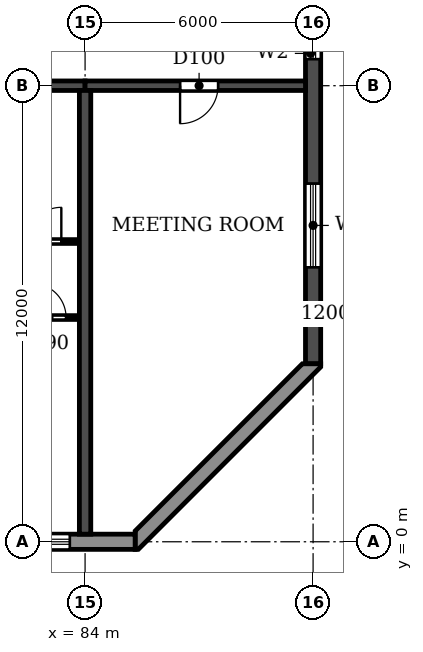
"""IFC4 building model, lengths in metres.
Left out: names, types, materials, properties, quantities, classifications, styles, units other than length and angle.
Written with IfcOpenShell. Run it as: python <this file> out.ifc"""

import sys

from ifc_helpers import new_model, si_unit, direction, frame, frame_2d, origin, place, context, subcontext, project, spatial, polyline, rectangle, outline, extrude, element, fill, save


model = new_model("IFC4")
c1 = context("Model", 3, precision=1e-05, world=origin(), true_north=direction((0.0, 1.0)))
c2 = subcontext(c1, "Body", "Model", "MODEL_VIEW")
j1 = project(units=[si_unit("LENGTHUNIT", "METRE"), si_unit("PLANEANGLEUNIT", "RADIAN")], contexts=[c1])
p1 = place(None, origin())
s1 = spatial("IfcSite", under=j1, at=p1, CompositionType="ELEMENT")
p2 = place(p1, origin())
s2 = spatial("IfcBuilding", under=s1, at=p2, CompositionType="ELEMENT")
p3 = place(p2, frame((0.0, 0.0, 152.1)))
s3 = spatial("IfcBuildingStorey", under=s2, at=p3, CompositionType="ELEMENT", Elevation=152.1)
p4 = place(p3, frame((84.0, 0.2, 0.0), z_axis=(0.0, 0.0, 1.0), x_axis=(0.0, 1.0, 0.0)))
e1 = element("IfcWall", 1, at=p4, inside=s3, PredefinedType="SHEAR", context=c2, shape_type="SweptSolid", body=[
    extrude(rectangle(XDim=11.675, YDim=0.3, at=frame_2d((5.837, 0.0))), origin(), (0.0, 0.0, 1.0), 3.07),
])
p5 = place(p3, frame((90.0, 4.683, 0.0), z_axis=(0.0, 0.0, 1.0), x_axis=(0.0, 1.0, 0.0)))
e2 = element("IfcWall", 2, at=p5, inside=s3, PredefinedType="SHEAR", context=c2, shape_type="SweptSolid", body=[
    extrude(rectangle(XDim=33.034, YDim=0.4, at=frame_2d((16.517, 0.0))), origin(), (0.0, 0.0, 1.0), 3.07),
])
p6 = place(p5, frame((23.817, 0.0, 0.9)))
e3 = element("IfcOpeningElement", 3, at=p6, cuts=e2, PredefinedType="OPENING", context=c2, shape_type="SweptSolid", body=[
    extrude(rectangle(XDim=1.2, YDim=1.5, at=frame_2d((0.6, 0.75))), frame((0.0, 0.21, 0.0), z_axis=(0.0, -1.0, 0.0), x_axis=(1.0, 0.0, 0.0)), (0.0, 0.0, 1.0), 0.42),
])
p7 = place(p5, frame((8.017, 0.0, 0.9)))
e4 = element("IfcOpeningElement", 4, at=p7, cuts=e2, PredefinedType="OPENING", context=c2, shape_type="SweptSolid", body=[
    extrude(rectangle(XDim=1.2, YDim=1.5, at=frame_2d((0.6, 0.75))), frame((0.0, 0.21, 0.0), z_axis=(0.0, -1.0, 0.0), x_axis=(1.0, 0.0, 0.0)), (0.0, 0.0, 1.0), 0.42),
])
p8 = place(p5, frame((28.293, 0.0, 0.6)))
e5 = element("IfcOpeningElement", 5, at=p8, cuts=e2, PredefinedType="OPENING", context=c2, shape_type="SweptSolid", body=[
    extrude(rectangle(XDim=2.2, YDim=1.8, at=frame_2d((1.1, 0.9))), frame((0.0, 0.21, 0.0), z_axis=(0.0, -1.0, 0.0), x_axis=(1.0, 0.0, 0.0)), (0.0, 0.0, 1.0), 0.42),
])
p9 = place(p5, frame((2.541, 0.0, 0.6)))
e6 = element("IfcOpeningElement", 6, at=p9, cuts=e2, PredefinedType="OPENING", context=c2, shape_type="SweptSolid", body=[
    extrude(rectangle(XDim=2.2, YDim=1.8, at=frame_2d((1.1, 0.9))), frame((0.0, 0.21, 0.0), z_axis=(0.0, -1.0, 0.0), x_axis=(1.0, 0.0, 0.0)), (0.0, 0.0, 1.0), 0.42),
])
p10 = place(p5, frame((19.417, 0.0, 0.6)))
e7 = element("IfcOpeningElement", 7, at=p10, cuts=e2, PredefinedType="OPENING", context=c2, shape_type="SweptSolid", body=[
    extrude(rectangle(XDim=2.2, YDim=1.8, at=frame_2d((1.1, 0.9))), frame((0.0, 0.21, 0.0), z_axis=(0.0, -1.0, 0.0), x_axis=(1.0, 0.0, 0.0)), (0.0, 0.0, 1.0), 0.42),
])
p11 = place(p3, frame((78.0, 12.0, 0.0), z_axis=(0.0, 0.0, 1.0), x_axis=(1.0, 0.0, 0.0)))
e8 = element("IfcWall", 8, at=p11, inside=s3, PredefinedType="SHEAR", context=c2, shape_type="SweptSolid", body=[
    extrude(rectangle(XDim=6.0, YDim=0.25, at=frame_2d((3.0, 0.0))), origin(), (0.0, 0.0, 1.0), 2.47),
])
p12 = place(p11, frame((2.45, 0.0, 0.0)))
e9 = element("IfcOpeningElement", 9, at=p12, cuts=e8, PredefinedType="OPENING", context=c2, shape_type="SweptSolid", body=[
    extrude(rectangle(XDim=1.0, YDim=2.1, at=frame_2d((0.5, 1.05))), frame((0.0, 0.135, 0.0), z_axis=(0.0, -1.0, 0.0), x_axis=(1.0, 0.0, 0.0)), (0.0, 0.0, 1.0), 0.27),
])
p13 = place(p3, frame((84.0, 12.0, 0.0), z_axis=(0.0, 0.0, 1.0), x_axis=(1.0, 0.0, 0.0)))
e10 = element("IfcWall", 10, at=p13, inside=s3, PredefinedType="SHEAR", context=c2, shape_type="SweptSolid", body=[
    extrude(rectangle(XDim=5.8, YDim=0.25, at=frame_2d((2.9, 0.0))), origin(), (0.0, 0.0, 1.0), 2.47),
])
p14 = place(p13, frame((2.5, 0.0, 0.0)))
e11 = element("IfcOpeningElement", 11, at=p14, cuts=e10, PredefinedType="OPENING", context=c2, shape_type="SweptSolid", body=[
    extrude(rectangle(XDim=1.0, YDim=2.1, at=frame_2d((0.5, 1.05))), frame((0.0, 0.135, 0.0), z_axis=(0.0, -1.0, 0.0), x_axis=(1.0, 0.0, 0.0)), (0.0, 0.0, 1.0), 0.27),
])
p15 = place(p3, frame((16.683, 0.0, 0.0), z_axis=(0.0, 0.0, 1.0), x_axis=(1.0, 0.0, 0.0)))
e12 = element("IfcWall", 12, at=p15, inside=s3, PredefinedType="STANDARD", context=c2, shape_type="SweptSolid", body=[
    extrude(rectangle(XDim=68.634, YDim=0.4, at=frame_2d((34.317, 0.0))), origin(), (0.0, 0.0, 1.0), 3.07),
])
p16 = place(p15, frame((1.717, 0.0, 0.9)))
e13 = element("IfcOpeningElement", 13, at=p16, cuts=e12, PredefinedType="OPENING", context=c2, shape_type="SweptSolid", body=[
    extrude(rectangle(XDim=2.2, YDim=1.5, at=frame_2d((1.1, 0.75))), frame((0.0, 0.21, 0.0), z_axis=(0.0, -1.0, 0.0), x_axis=(1.0, 0.0, 0.0)), (0.0, 0.0, 1.0), 0.42),
])
p17 = place(p15, frame((4.717, 0.0, 0.9)))
e14 = element("IfcOpeningElement", 14, at=p17, cuts=e12, PredefinedType="OPENING", context=c2, shape_type="SweptSolid", body=[
    extrude(rectangle(XDim=2.2, YDim=1.5, at=frame_2d((1.1, 0.75))), frame((0.0, 0.21, 0.0), z_axis=(0.0, -1.0, 0.0), x_axis=(1.0, 0.0, 0.0)), (0.0, 0.0, 1.0), 0.42),
])
p18 = place(p15, frame((7.917, 0.0, 0.0)))
e15 = element("IfcOpeningElement", 15, at=p18, cuts=e12, PredefinedType="OPENING", context=c2, shape_type="SweptSolid", body=[
    extrude(rectangle(XDim=1.8, YDim=2.4, at=frame_2d((0.9, 1.2))), frame((0.0, 0.21, 0.0), z_axis=(0.0, -1.0, 0.0), x_axis=(1.0, 0.0, 0.0)), (0.0, 0.0, 1.0), 0.42),
])
p19 = place(p15, frame((10.717, 0.0, 0.9)))
e16 = element("IfcOpeningElement", 16, at=p19, cuts=e12, PredefinedType="OPENING", context=c2, shape_type="SweptSolid", body=[
    extrude(rectangle(XDim=2.2, YDim=1.5, at=frame_2d((1.1, 0.75))), frame((0.0, 0.21, 0.0), z_axis=(0.0, -1.0, 0.0), x_axis=(1.0, 0.0, 0.0)), (0.0, 0.0, 1.0), 0.42),
])
p20 = place(p15, frame((13.717, 0.0, 0.9)))
e17 = element("IfcOpeningElement", 17, at=p20, cuts=e12, PredefinedType="OPENING", context=c2, shape_type="SweptSolid", body=[
    extrude(rectangle(XDim=2.2, YDim=1.5, at=frame_2d((1.1, 0.75))), frame((0.0, 0.21, 0.0), z_axis=(0.0, -1.0, 0.0), x_axis=(1.0, 0.0, 0.0)), (0.0, 0.0, 1.0), 0.42),
])
p21 = place(p15, frame((16.717, 0.0, 0.9)))
e18 = element("IfcOpeningElement", 18, at=p21, cuts=e12, PredefinedType="OPENING", context=c2, shape_type="SweptSolid", body=[
    extrude(rectangle(XDim=2.2, YDim=1.5, at=frame_2d((1.1, 0.75))), frame((0.0, 0.21, 0.0), z_axis=(0.0, -1.0, 0.0), x_axis=(1.0, 0.0, 0.0)), (0.0, 0.0, 1.0), 0.42),
])
p22 = place(p15, frame((19.717, 0.0, 0.9)))
e19 = element("IfcOpeningElement", 19, at=p22, cuts=e12, PredefinedType="OPENING", context=c2, shape_type="SweptSolid", body=[
    extrude(rectangle(XDim=2.2, YDim=1.5, at=frame_2d((1.1, 0.75))), frame((0.0, 0.21, 0.0), z_axis=(0.0, -1.0, 0.0), x_axis=(1.0, 0.0, 0.0)), (0.0, 0.0, 1.0), 0.42),
])
p23 = place(p15, frame((22.917, 0.0, 0.0)))
e20 = element("IfcOpeningElement", 20, at=p23, cuts=e12, PredefinedType="OPENING", context=c2, shape_type="SweptSolid", body=[
    extrude(rectangle(XDim=1.8, YDim=2.4, at=frame_2d((0.9, 1.2))), frame((0.0, 0.21, 0.0), z_axis=(0.0, -1.0, 0.0), x_axis=(1.0, 0.0, 0.0)), (0.0, 0.0, 1.0), 0.42),
])
p24 = place(p15, frame((25.717, 0.0, 0.9)))
e21 = element("IfcOpeningElement", 21, at=p24, cuts=e12, PredefinedType="OPENING", context=c2, shape_type="SweptSolid", body=[
    extrude(rectangle(XDim=2.2, YDim=1.5, at=frame_2d((1.1, 0.75))), frame((0.0, 0.21, 0.0), z_axis=(0.0, -1.0, 0.0), x_axis=(1.0, 0.0, 0.0)), (0.0, 0.0, 1.0), 0.42),
])
p25 = place(p15, frame((28.717, 0.0, 0.9)))
e22 = element("IfcOpeningElement", 22, at=p25, cuts=e12, PredefinedType="OPENING", context=c2, shape_type="SweptSolid", body=[
    extrude(rectangle(XDim=2.2, YDim=1.5, at=frame_2d((1.1, 0.75))), frame((0.0, 0.21, 0.0), z_axis=(0.0, -1.0, 0.0), x_axis=(1.0, 0.0, 0.0)), (0.0, 0.0, 1.0), 0.42),
])
p26 = place(p15, frame((31.917, 0.0, 0.0)))
e23 = element("IfcOpeningElement", 23, at=p26, cuts=e12, PredefinedType="OPENING", context=c2, shape_type="SweptSolid", body=[
    extrude(rectangle(XDim=1.8, YDim=2.4, at=frame_2d((0.9, 1.2))), frame((0.0, 0.21, 0.0), z_axis=(0.0, -1.0, 0.0), x_axis=(1.0, 0.0, 0.0)), (0.0, 0.0, 1.0), 0.42),
])
p27 = place(p15, frame((34.717, 0.0, 0.9)))
e24 = element("IfcOpeningElement", 24, at=p27, cuts=e12, PredefinedType="OPENING", context=c2, shape_type="SweptSolid", body=[
    extrude(rectangle(XDim=2.2, YDim=1.5, at=frame_2d((1.1, 0.75))), frame((0.0, 0.21, 0.0), z_axis=(0.0, -1.0, 0.0), x_axis=(1.0, 0.0, 0.0)), (0.0, 0.0, 1.0), 0.42),
])
p28 = place(p15, frame((37.717, 0.0, 0.9)))
e25 = element("IfcOpeningElement", 25, at=p28, cuts=e12, PredefinedType="OPENING", context=c2, shape_type="SweptSolid", body=[
    extrude(rectangle(XDim=2.2, YDim=1.5, at=frame_2d((1.1, 0.75))), frame((0.0, 0.21, 0.0), z_axis=(0.0, -1.0, 0.0), x_axis=(1.0, 0.0, 0.0)), (0.0, 0.0, 1.0), 0.42),
])
p29 = place(p15, frame((40.717, 0.0, 0.9)))
e26 = element("IfcOpeningElement", 26, at=p29, cuts=e12, PredefinedType="OPENING", context=c2, shape_type="SweptSolid", body=[
    extrude(rectangle(XDim=2.2, YDim=1.5, at=frame_2d((1.1, 0.75))), frame((0.0, 0.21, 0.0), z_axis=(0.0, -1.0, 0.0), x_axis=(1.0, 0.0, 0.0)), (0.0, 0.0, 1.0), 0.42),
])
p30 = place(p15, frame((43.717, 0.0, 0.9)))
e27 = element("IfcOpeningElement", 27, at=p30, cuts=e12, PredefinedType="OPENING", context=c2, shape_type="SweptSolid", body=[
    extrude(rectangle(XDim=2.2, YDim=1.5, at=frame_2d((1.1, 0.75))), frame((0.0, 0.21, 0.0), z_axis=(0.0, -1.0, 0.0), x_axis=(1.0, 0.0, 0.0)), (0.0, 0.0, 1.0), 0.42),
])
p31 = place(p15, frame((46.917, 0.0, 0.0)))
e28 = element("IfcOpeningElement", 28, at=p31, cuts=e12, PredefinedType="OPENING", context=c2, shape_type="SweptSolid", body=[
    extrude(rectangle(XDim=1.8, YDim=2.4, at=frame_2d((0.9, 1.2))), frame((0.0, 0.21, 0.0), z_axis=(0.0, -1.0, 0.0), x_axis=(1.0, 0.0, 0.0)), (0.0, 0.0, 1.0), 0.42),
])
p32 = place(p15, frame((49.717, 0.0, 0.9)))
e29 = element("IfcOpeningElement", 29, at=p32, cuts=e12, PredefinedType="OPENING", context=c2, shape_type="SweptSolid", body=[
    extrude(rectangle(XDim=2.2, YDim=1.5, at=frame_2d((1.1, 0.75))), frame((0.0, 0.21, 0.0), z_axis=(0.0, -1.0, 0.0), x_axis=(1.0, 0.0, 0.0)), (0.0, 0.0, 1.0), 0.42),
])
p33 = place(p15, frame((52.717, 0.0, 0.9)))
e30 = element("IfcOpeningElement", 30, at=p33, cuts=e12, PredefinedType="OPENING", context=c2, shape_type="SweptSolid", body=[
    extrude(rectangle(XDim=2.2, YDim=1.5, at=frame_2d((1.1, 0.75))), frame((0.0, 0.21, 0.0), z_axis=(0.0, -1.0, 0.0), x_axis=(1.0, 0.0, 0.0)), (0.0, 0.0, 1.0), 0.42),
])
p34 = place(p15, frame((55.717, 0.0, 0.9)))
e31 = element("IfcOpeningElement", 31, at=p34, cuts=e12, PredefinedType="OPENING", context=c2, shape_type="SweptSolid", body=[
    extrude(rectangle(XDim=2.2, YDim=1.5, at=frame_2d((1.1, 0.75))), frame((0.0, 0.21, 0.0), z_axis=(0.0, -1.0, 0.0), x_axis=(1.0, 0.0, 0.0)), (0.0, 0.0, 1.0), 0.42),
])
p35 = place(p15, frame((58.917, 0.0, 0.0)))
e32 = element("IfcOpeningElement", 32, at=p35, cuts=e12, PredefinedType="OPENING", context=c2, shape_type="SweptSolid", body=[
    extrude(rectangle(XDim=1.8, YDim=2.4, at=frame_2d((0.9, 1.2))), frame((0.0, 0.21, 0.0), z_axis=(0.0, -1.0, 0.0), x_axis=(1.0, 0.0, 0.0)), (0.0, 0.0, 1.0), 0.42),
])
p36 = place(p15, frame((61.717, 0.0, 0.9)))
e33 = element("IfcOpeningElement", 33, at=p36, cuts=e12, PredefinedType="OPENING", context=c2, shape_type="SweptSolid", body=[
    extrude(rectangle(XDim=2.2, YDim=1.5, at=frame_2d((1.1, 0.75))), frame((0.0, 0.21, 0.0), z_axis=(0.0, -1.0, 0.0), x_axis=(1.0, 0.0, 0.0)), (0.0, 0.0, 1.0), 0.42),
])
p37 = place(p15, frame((64.717, 0.0, 0.9)))
e34 = element("IfcOpeningElement", 34, at=p37, cuts=e12, PredefinedType="OPENING", context=c2, shape_type="SweptSolid", body=[
    extrude(rectangle(XDim=2.2, YDim=1.5, at=frame_2d((1.1, 0.75))), frame((0.0, 0.21, 0.0), z_axis=(0.0, -1.0, 0.0), x_axis=(1.0, 0.0, 0.0)), (0.0, 0.0, 1.0), 0.42),
])
p38 = place(p3, origin())
e35 = element("IfcWall", 35, at=p38, inside=s3, PredefinedType="STANDARD", context=c2, shape_type="SweptSolid", body=[
    extrude(outline(polyline([(85.317, -0.2), (85.4, -0.2), (90.2, 4.6), (90.2, 4.683), (89.717, 4.683), (85.317, 0.283), (85.317, -0.2)])), origin(), (0.0, 0.0, 1.0), 3.07),
])
p39 = place(p3, frame((80.95, 5.9, 0.0), z_axis=(0.0, 0.0, 1.0), x_axis=(1.0, 0.0, 0.0)))
e36 = element("IfcWall", 36, at=p39, inside=s3, PredefinedType="PARTITIONING", context=c2, shape_type="SweptSolid", body=[
    extrude(rectangle(XDim=2.89, YDim=0.1, at=frame_2d((1.445, 0.0))), origin(), (0.0, 0.0, 1.0), 3.07),
])
p40 = place(p39, frame((1.65, 0.0, 0.0)))
e37 = element("IfcOpeningElement", 37, at=p40, cuts=e36, PredefinedType="OPENING", context=c2, shape_type="SweptSolid", body=[
    extrude(rectangle(XDim=0.9, YDim=2.1, at=frame_2d((0.45, 1.05))), frame((0.0, 0.06, 0.0), z_axis=(0.0, -1.0, 0.0), x_axis=(1.0, 0.0, 0.0)), (0.0, 0.0, 1.0), 0.12),
])
p41 = place(p3, frame((81.8, 7.9, 0.0), z_axis=(0.0, 0.0, 1.0), x_axis=(1.0, 0.0, 0.0)))
e38 = element("IfcWall", 38, at=p41, inside=s3, PredefinedType="PARTITIONING", context=c2, shape_type="SweptSolid", body=[
    extrude(rectangle(XDim=2.04, YDim=0.1, at=frame_2d((1.02, 0.0))), origin(), (0.0, 0.0, 1.0), 3.07),
])
p42 = place(p41, frame((0.675, 0.0, 0.0)))
e39 = element("IfcOpeningElement", 39, at=p42, cuts=e38, PredefinedType="OPENING", context=c2, shape_type="SweptSolid", body=[
    extrude(rectangle(XDim=0.9, YDim=2.1, at=frame_2d((0.45, 1.05))), frame((0.0, 0.06, 0.0), z_axis=(0.0, -1.0, 0.0), x_axis=(1.0, 0.0, 0.0)), (0.0, 0.0, 1.0), 0.12),
])
p43 = place(p37, origin())
e40 = element("IfcWindow", 40, at=p43, inside=s3, PartitioningType="DOUBLE_PANEL_HORIZONTAL", PredefinedType="WINDOW", context=c2, shape_type="SweptSolid", body=[
    extrude(rectangle(XDim=2.2, YDim=1.5, at=frame_2d((1.1, 0.75))), frame((0.0, 0.03, 0.0), z_axis=(0.0, -1.0, 0.0), x_axis=(1.0, 0.0, 0.0)), (0.0, 0.0, 1.0), 0.06),
])
fill(e34, e40)
p44 = place(p7, origin())
e41 = element("IfcWindow", 41, at=p44, inside=s3, PartitioningType="SINGLE_PANEL", PredefinedType="WINDOW", context=c2, shape_type="SweptSolid", body=[
    extrude(rectangle(XDim=1.2, YDim=1.5, at=frame_2d((0.6, 0.75))), frame((0.0, 0.03, 0.0), z_axis=(0.0, -1.0, 0.0), x_axis=(1.0, 0.0, 0.0)), (0.0, 0.0, 1.0), 0.06),
])
fill(e4, e41)
p45 = place(p9, origin())
e42 = element("IfcWindow", 42, at=p45, inside=s3, PartitioningType="DOUBLE_PANEL_HORIZONTAL", PredefinedType="WINDOW", context=c2, shape_type="SweptSolid", body=[
    extrude(rectangle(XDim=2.2, YDim=1.8, at=frame_2d((1.1, 0.9))), frame((0.0, 0.03, 0.0), z_axis=(0.0, -1.0, 0.0), x_axis=(1.0, 0.0, 0.0)), (0.0, 0.0, 1.0), 0.06),
])
fill(e6, e42)
p46 = place(p42, origin())
e43 = element("IfcDoor", 43, at=p46, inside=s3, OperationType="SINGLE_SWING_RIGHT", PredefinedType="DOOR", context=c2, shape_type="SweptSolid", body=[
    extrude(rectangle(XDim=0.9, YDim=2.1, at=frame_2d((0.45, 1.05))), frame((0.0, 0.025, 0.0), z_axis=(0.0, -1.0, 0.0), x_axis=(1.0, 0.0, 0.0)), (0.0, 0.0, 1.0), 0.05),
])
fill(e39, e43)
p47 = place(p40, origin())
e44 = element("IfcDoor", 44, at=p47, inside=s3, OperationType="SINGLE_SWING_LEFT", PredefinedType="DOOR", context=c2, shape_type="SweptSolid", body=[
    extrude(rectangle(XDim=0.9, YDim=2.1, at=frame_2d((0.45, 1.05))), frame((0.0, 0.025, 0.0), z_axis=(0.0, -1.0, 0.0), x_axis=(1.0, 0.0, 0.0)), (0.0, 0.0, 1.0), 0.05),
])
fill(e37, e44)
p48 = place(p14, frame((1.0, 0.0, 0.0), z_axis=(0.0, 0.0, 1.0), x_axis=(-1.0, 0.0, 0.0)))
e45 = element("IfcDoor", 45, at=p48, inside=s3, OperationType="SINGLE_SWING_RIGHT", PredefinedType="DOOR", context=c2, shape_type="SweptSolid", body=[
    extrude(rectangle(XDim=1.0, YDim=2.1, at=frame_2d((0.5, 1.05))), frame((0.0, 0.025, 0.0), z_axis=(0.0, -1.0, 0.0), x_axis=(1.0, 0.0, 0.0)), (0.0, 0.0, 1.0), 0.05),
])
fill(e11, e45)
save(model, sys.argv[1])
